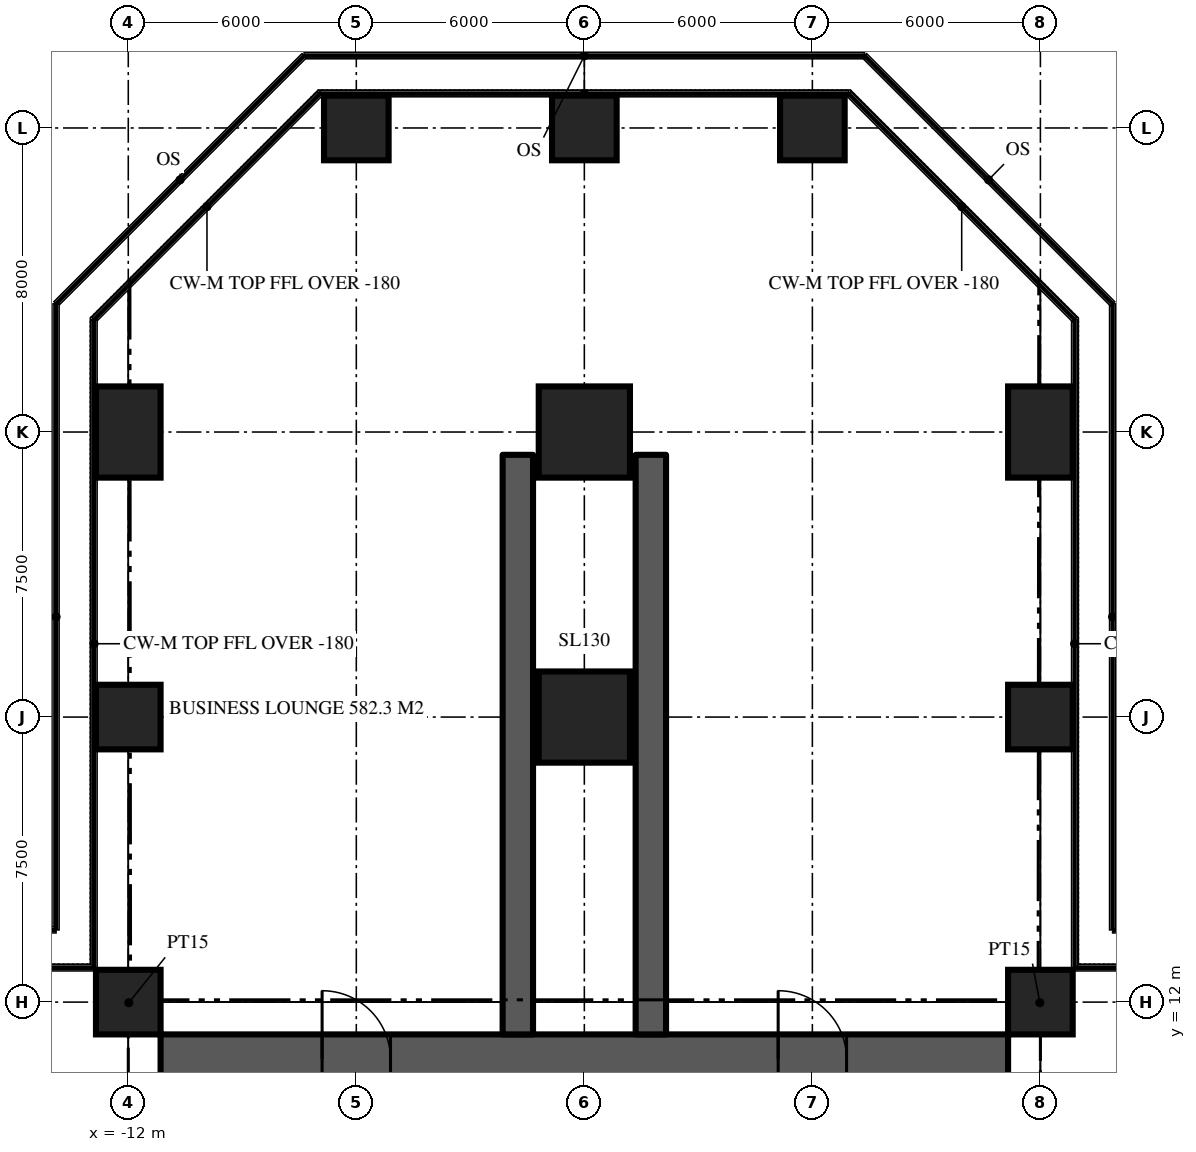
"""IFC4 building model, lengths in metres.
Left out: names, types, materials, properties, quantities, classifications, styles, units other than length and angle.
Written with IfcOpenShell. Run it as: python <this file> out.ifc"""

import sys

from ifc_helpers import new_model, si_unit, direction, frame, frame_2d, origin, origin_2d, place, context, subcontext, project, spatial, rectangle, extrude, element, fill, save


model = new_model("IFC4")
c1 = context("Model", 3, precision=1e-05, world=origin(), true_north=direction((0.0, 1.0)))
c2 = subcontext(c1, "Body", "Model", "MODEL_VIEW")
j1 = project(units=[si_unit("LENGTHUNIT", "METRE"), si_unit("PLANEANGLEUNIT", "RADIAN")], contexts=[c1])
p1 = place(None, origin())
s1 = spatial("IfcSite", under=j1, at=p1, CompositionType="ELEMENT")
p2 = place(p1, origin())
s2 = spatial("IfcBuilding", under=s1, at=p2, CompositionType="ELEMENT")
p3 = place(p2, frame((0.0, 0.0, 113.7)))
s3 = spatial("IfcBuildingStorey", under=s2, at=p3, CompositionType="ELEMENT", Elevation=113.7)
p4 = place(p3, frame((-11.15, 10.5, 0.0), z_axis=(0.0, 0.0, 1.0), x_axis=(1.0, 0.0, 0.0)))
e1 = element("IfcWall", 1, at=p4, inside=s3, PredefinedType="SHEAR", context=c2, shape_type="SweptSolid", body=[
    extrude(rectangle(XDim=22.3, YDim=1.3, at=frame_2d((11.15, 0.0))), origin(), (0.0, 0.0, 1.0), 4.5),
])
p5 = place(p4, frame((4.25, 0.0, 0.0)))
e2 = element("IfcOpeningElement", 2, at=p5, cuts=e1, PredefinedType="OPENING", context=c2, shape_type="SweptSolid", body=[
    extrude(rectangle(XDim=1.8, YDim=2.2, at=frame_2d((0.9, 1.1))), frame((0.0, 0.66, 0.0), z_axis=(0.0, -1.0, 0.0), x_axis=(1.0, 0.0, 0.0)), (0.0, 0.0, 1.0), 1.32),
])
p6 = place(p4, frame((16.25, 0.0, 0.0)))
e3 = element("IfcOpeningElement", 3, at=p6, cuts=e1, PredefinedType="OPENING", context=c2, shape_type="SweptSolid", body=[
    extrude(rectangle(XDim=1.8, YDim=2.2, at=frame_2d((0.9, 1.1))), frame((0.0, 0.66, 0.0), z_axis=(0.0, -1.0, 0.0), x_axis=(1.0, 0.0, 0.0)), (0.0, 0.0, 1.0), 1.32),
])
for number, where, z_axis, x_axis in (
    (4, (1.75, 11.15, 0.0), (0.0, 0.0, 1.0), (0.0, 1.0, 0.0)),
    (5, (-1.75, 11.15, 0.0), (0.0, 0.0, 1.0), (0.0, 1.0, 0.0)),
):
    element("IfcWall", number, at=place(p3, frame(where, z_axis=z_axis, x_axis=x_axis)), inside=s3, PredefinedType="SHEAR", context=c2, shape_type="SweptSolid", body=[
        extrude(rectangle(XDim=15.25, YDim=0.8, at=frame_2d((7.625, 0.0))), origin(), (0.0, 0.0, 1.0), 4.5),
    ])
for number, where, z_axis, x_axis in (
    (6, (-12.0, 12.0, 0.0), (0.0, 0.0, 1.0), (1.0, 0.0, 0.0)),
    (7, (12.0, 12.0, 0.0), (0.0, 0.0, 1.0), (1.0, 0.0, 0.0)),
    (8, (-12.0, 19.5, 0.0), (0.0, 0.0, 1.0), (1.0, 0.0, 0.0)),
):
    element("IfcColumn", number, at=place(p3, frame(where, z_axis=z_axis, x_axis=x_axis)), inside=s3, PredefinedType="COLUMN", context=c2, shape_type="SweptSolid", body=[
        extrude(rectangle(XDim=1.7, YDim=1.7, at=origin_2d()), origin(), (0.0, 0.0, 1.0), 4.5),
    ])
p7 = place(p3, frame((0.0, 19.5, 0.0), z_axis=(0.0, 0.0, 1.0), x_axis=(1.0, 0.0, 0.0)))
e9 = element("IfcColumn", 9, at=p7, inside=s3, PredefinedType="COLUMN", context=c2, shape_type="SweptSolid", body=[
    extrude(rectangle(XDim=2.4, YDim=2.4, at=origin_2d()), origin(), (0.0, 0.0, 1.0), 4.5),
])
p8 = place(p3, frame((12.0, 19.5, 0.0), z_axis=(0.0, 0.0, 1.0), x_axis=(1.0, 0.0, 0.0)))
e10 = element("IfcColumn", 10, at=p8, inside=s3, PredefinedType="COLUMN", context=c2, shape_type="SweptSolid", body=[
    extrude(rectangle(XDim=1.7, YDim=1.7, at=origin_2d()), origin(), (0.0, 0.0, 1.0), 4.5),
])
p9 = place(p3, frame((-12.0, 27.0, 0.0), z_axis=(0.0, 0.0, 1.0), x_axis=(1.0, 0.0, 0.0)))
e11 = element("IfcColumn", 11, at=p9, inside=s3, PredefinedType="COLUMN", context=c2, shape_type="SweptSolid", body=[
    extrude(rectangle(XDim=1.7, YDim=2.4, at=origin_2d()), origin(), (0.0, 0.0, 1.0), 4.5),
])
p10 = place(p3, frame((0.0, 27.0, 0.0), z_axis=(0.0, 0.0, 1.0), x_axis=(1.0, 0.0, 0.0)))
e12 = element("IfcColumn", 12, at=p10, inside=s3, PredefinedType="COLUMN", context=c2, shape_type="SweptSolid", body=[
    extrude(rectangle(XDim=2.4, YDim=2.4, at=origin_2d()), origin(), (0.0, 0.0, 1.0), 4.5),
])
p11 = place(p3, frame((12.0, 27.0, 0.0), z_axis=(0.0, 0.0, 1.0), x_axis=(1.0, 0.0, 0.0)))
e13 = element("IfcColumn", 13, at=p11, inside=s3, PredefinedType="COLUMN", context=c2, shape_type="SweptSolid", body=[
    extrude(rectangle(XDim=1.7, YDim=2.4, at=origin_2d()), origin(), (0.0, 0.0, 1.0), 4.5),
])
for number, where, z_axis, x_axis in (
    (14, (-6.0, 35.0, 0.0), (0.0, 0.0, 1.0), (1.0, 0.0, 0.0)),
    (15, (0.0, 35.0, 0.0), (0.0, 0.0, 1.0), (1.0, 0.0, 0.0)),
    (16, (6.0, 35.0, 0.0), (0.0, 0.0, 1.0), (1.0, 0.0, 0.0)),
):
    element("IfcColumn", number, at=place(p3, frame(where, z_axis=z_axis, x_axis=x_axis)), inside=s3, PredefinedType="COLUMN", context=c2, shape_type="SweptSolid", body=[
        extrude(rectangle(XDim=1.7, YDim=1.7, at=origin_2d()), origin(), (0.0, 0.0, 1.0), 4.5),
    ])
for number, where, z_axis, x_axis in (
    (17, (11.15, 11.15, 0.0), (0.0, 0.0, 1.0), (0.707, 0.707, 0.0)),
    (18, (-11.15, 11.15, 0.0), (0.0, 0.0, 1.0), (-0.707, 0.707, 0.0)),
):
    element("IfcWall", number, at=place(p3, frame(where, z_axis=z_axis, x_axis=x_axis)), inside=s3, PredefinedType="PARTITIONING", context=c2, shape_type="SweptSolid", body=[
        extrude(rectangle(XDim=2.362, YDim=0.15, at=frame_2d((1.181, 0.0))), origin(), (0.0, 0.0, 1.0), 4.32),
    ])
p12 = place(p5, origin())
e19 = element("IfcDoor", 19, at=p12, inside=s3, OperationType="DOUBLE_DOOR_DOUBLE_SWING", PredefinedType="DOOR", context=c2, shape_type="SweptSolid", body=[
    extrude(rectangle(XDim=1.8, YDim=2.2, at=frame_2d((0.9, 1.1))), frame((0.0, 0.025, 0.0), z_axis=(0.0, -1.0, 0.0), x_axis=(1.0, 0.0, 0.0)), (0.0, 0.0, 1.0), 0.05),
])
fill(e2, e19)
p13 = place(p6, origin())
e20 = element("IfcDoor", 20, at=p13, inside=s3, OperationType="DOUBLE_DOOR_DOUBLE_SWING", PredefinedType="DOOR", context=c2, shape_type="SweptSolid", body=[
    extrude(rectangle(XDim=1.8, YDim=2.2, at=frame_2d((0.9, 1.1))), frame((0.0, 0.025, 0.0), z_axis=(0.0, -1.0, 0.0), x_axis=(1.0, 0.0, 0.0)), (0.0, 0.0, 1.0), 0.05),
])
fill(e3, e20)
save(model, sys.argv[1])
